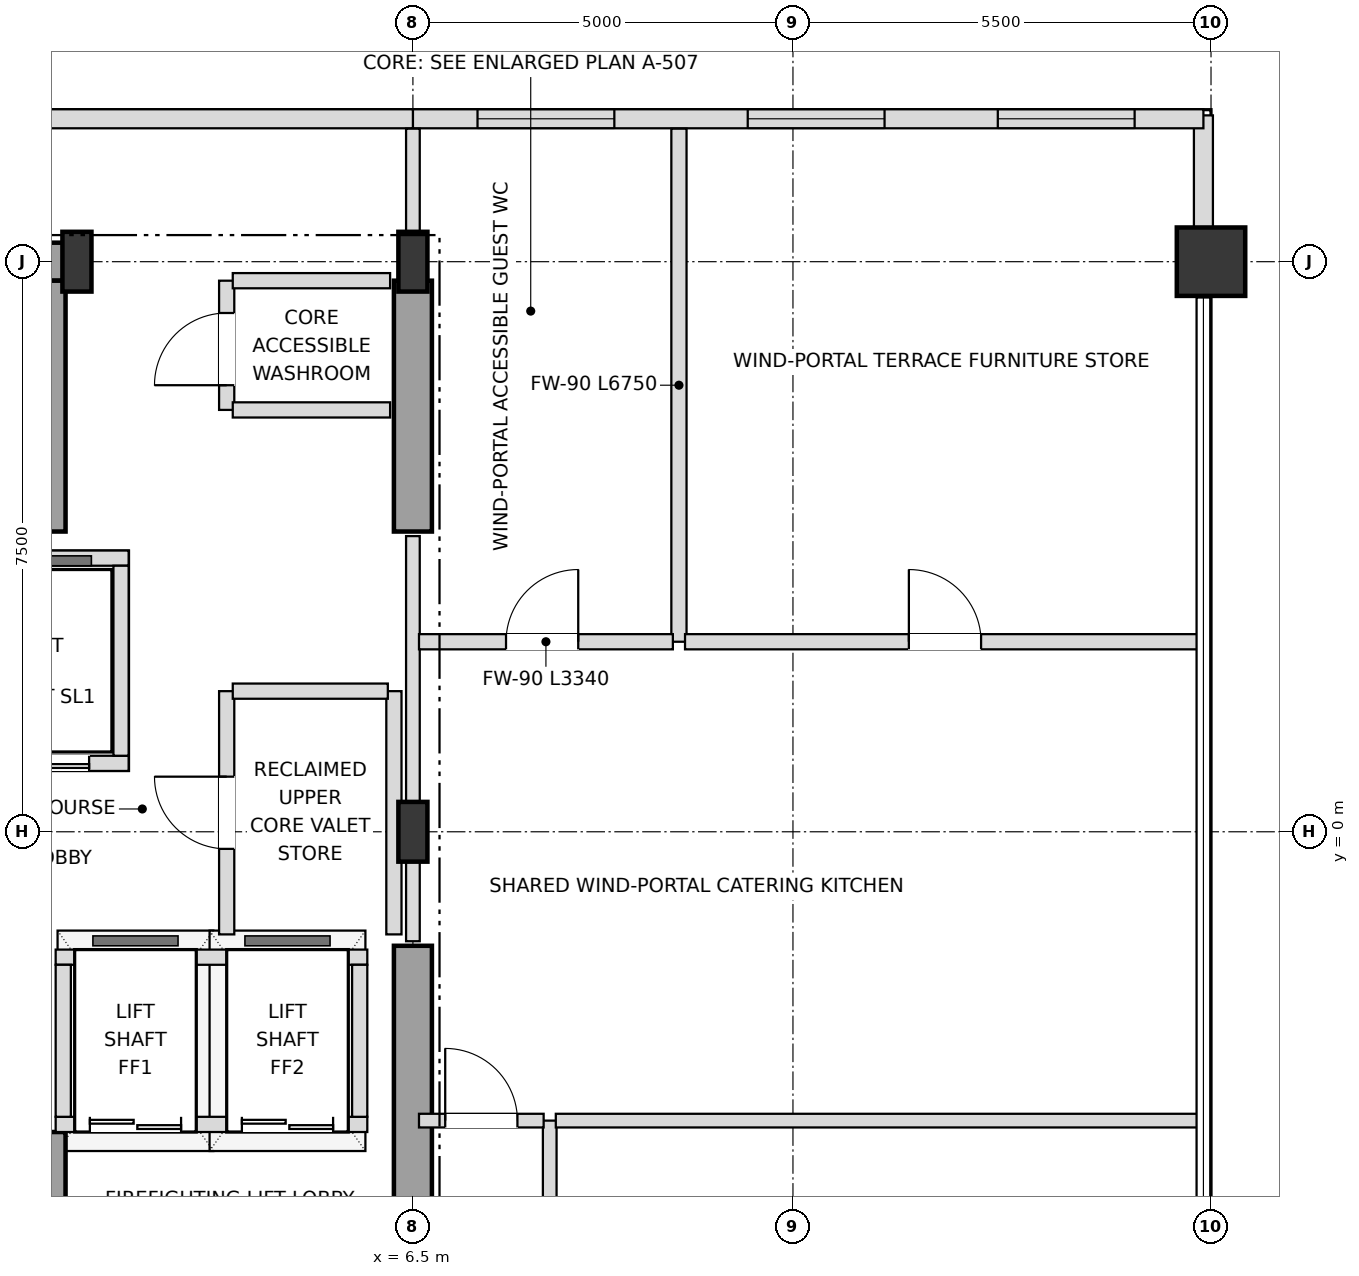
"""IFC4 building model, lengths in metres.
Left out: names, types, materials, properties, quantities, classifications, styles, units other than length and angle.
Written with IfcOpenShell. Run it as: python <this file> out.ifc"""

import sys

from ifc_helpers import new_model, si_unit, direction, frame, frame_2d, origin, origin_2d, place, context, subcontext, project, spatial, rectangle, i_section, extrude, element, fill, save


model = new_model("IFC4")
c1 = context("Model", 3, precision=1e-05, world=origin(), true_north=direction((0.0, 1.0)))
c2 = subcontext(c1, "Body", "Model", "MODEL_VIEW")
j1 = project(units=[si_unit("LENGTHUNIT", "METRE"), si_unit("PLANEANGLEUNIT", "RADIAN")], contexts=[c1])
p1 = place(None, origin())
s1 = spatial("IfcSite", under=j1, at=p1, CompositionType="ELEMENT")
p2 = place(p1, origin())
s2 = spatial("IfcBuilding", under=s1, at=p2, CompositionType="ELEMENT")
p3 = place(p2, frame((0.0, 0.0, 265.5)))
s3 = spatial("IfcBuildingStorey", under=s2, at=p3, CompositionType="ELEMENT", Elevation=265.5)
for number, where, z_axis, x_axis in (
    (1, (6.5, 0.0, 0.0), (0.0, 0.0, 1.0), (1.0, 0.0, 0.0)),
    (2, (2.08, 7.5, 0.0), (0.0, 0.0, 1.0), (1.0, 0.0, 0.0)),
    (3, (6.5, 7.5, 0.0), (0.0, 0.0, 1.0), (1.0, 0.0, 0.0)),
):
    element("IfcColumn", number, at=place(p3, frame(where, z_axis=z_axis, x_axis=x_axis)), inside=s3, PredefinedType="COLUMN", context=c2, shape_type="SweptSolid", body=[
        extrude(i_section(OverallWidth=0.382, OverallDepth=0.786, WebThickness=0.02, FlangeThickness=0.033, at=origin_2d()), origin(), (0.0, 0.0, 1.0), 3.6),
    ])
p4 = place(p3, frame((17.0, 7.5, 0.0), z_axis=(0.0, 0.0, 1.0), x_axis=(1.0, 0.0, 0.0)))
e4 = element("IfcColumn", 4, at=p4, inside=s3, PredefinedType="USERDEFINED", context=c2, shape_type="SweptSolid", body=[
    extrude(rectangle(XDim=0.9, YDim=0.9, at=origin_2d()), origin(), (0.0, 0.0, 1.0), 3.6),
])
p5 = place(p3, frame((16.9, 7.945, 0.0), z_axis=(0.0, 0.0, 1.0), x_axis=(0.0, 1.0, 0.0)))
e5 = element("IfcWall", 5, at=p5, inside=s3, PredefinedType="SOLIDWALL", context=c2, shape_type="SweptSolid", body=[
    extrude(rectangle(XDim=1.48, YDim=0.25, at=frame_2d((0.74, 0.0))), origin(), (0.0, 0.0, 1.0), 2.748),
])
p6 = place(p3, frame((6.5, 9.38, 0.0), z_axis=(0.0, 0.0, 1.0), x_axis=(1.0, 0.0, 0.0)))
e6 = element("IfcWall", 6, at=p6, inside=s3, PredefinedType="SOLIDWALL", context=c2, shape_type="SweptSolid", body=[
    extrude(rectangle(XDim=10.4, YDim=0.25, at=frame_2d((5.2, 0.0))), origin(), (0.0, 0.0, 1.0), 2.826),
])
p7 = place(p6, frame((0.85, 0.0, 0.72)))
e7 = element("IfcOpeningElement", 7, at=p7, cuts=e6, PredefinedType="OPENING", context=c2, shape_type="SweptSolid", body=[
    extrude(rectangle(XDim=1.8, YDim=1.68, at=frame_2d((0.9, 0.84))), frame((0.0, 0.135, 0.0), z_axis=(0.0, -1.0, 0.0), x_axis=(1.0, 0.0, 0.0)), (0.0, 0.0, 1.0), 0.27),
])
p8 = place(p6, frame((4.405, 0.0, 0.72)))
e8 = element("IfcOpeningElement", 8, at=p8, cuts=e6, PredefinedType="OPENING", context=c2, shape_type="SweptSolid", body=[
    extrude(rectangle(XDim=1.8, YDim=1.68, at=frame_2d((0.9, 0.84))), frame((0.0, 0.135, 0.0), z_axis=(0.0, -1.0, 0.0), x_axis=(1.0, 0.0, 0.0)), (0.0, 0.0, 1.0), 0.27),
])
p9 = place(p6, frame((7.695, 0.0, 0.72)))
e9 = element("IfcOpeningElement", 9, at=p9, cuts=e6, PredefinedType="OPENING", context=c2, shape_type="SweptSolid", body=[
    extrude(rectangle(XDim=1.8, YDim=1.68, at=frame_2d((0.9, 0.84))), frame((0.0, 0.135, 0.0), z_axis=(0.0, -1.0, 0.0), x_axis=(1.0, 0.0, 0.0)), (0.0, 0.0, 1.0), 0.27),
])
p10 = place(p3, frame((-6.5, 9.38, 0.0), z_axis=(0.0, 0.0, 1.0), x_axis=(1.0, 0.0, 0.0)))
e10 = element("IfcWall", 10, at=p10, inside=s3, PredefinedType="SOLIDWALL", context=c2, shape_type="SweptSolid", body=[
    extrude(rectangle(XDim=13.0, YDim=0.25, at=frame_2d((6.5, 0.0))), origin(), (0.0, 0.0, 1.0), 2.826),
])
p11 = place(p3, frame((0.0, 7.5, 0.0), z_axis=(0.0, 0.0, 1.0), x_axis=(1.0, 0.0, 0.0)))
e11 = element("IfcWall", 11, at=p11, inside=s3, PredefinedType="SHEAR", context=c2, shape_type="SweptSolid", body=[
    extrude(rectangle(XDim=2.08, YDim=0.5, at=frame_2d((1.04, 0.0))), origin(), (0.0, 0.0, 1.0), 3.38),
])
p12 = place(p3, frame((6.5, -7.25, 0.0), z_axis=(0.0, 0.0, 1.0), x_axis=(0.0, 1.0, 0.0)))
e12 = element("IfcWall", 12, at=p12, inside=s3, PredefinedType="SHEAR", context=c2, shape_type="SweptSolid", body=[
    extrude(rectangle(XDim=5.75, YDim=0.5, at=frame_2d((2.875, 0.0))), origin(), (0.0, 0.0, 1.0), 3.38),
])
p13 = place(p12, frame((0.85, 0.0, 0.0)))
e13 = element("IfcOpeningElement", 13, at=p13, cuts=e12, PredefinedType="OPENING", context=c2, shape_type="SweptSolid", body=[
    extrude(rectangle(XDim=1.05, YDim=2.15, at=frame_2d((0.525, 1.075))), frame((0.0, 0.26, 0.0), z_axis=(0.0, -1.0, 0.0), x_axis=(1.0, 0.0, 0.0)), (0.0, 0.0, 1.0), 0.52),
])
p14 = place(p3, frame((6.5, 3.95, 0.0), z_axis=(0.0, 0.0, 1.0), x_axis=(0.0, 1.0, 0.0)))
e14 = element("IfcWall", 14, at=p14, inside=s3, PredefinedType="SHEAR", context=c2, shape_type="SweptSolid", body=[
    extrude(rectangle(XDim=3.3, YDim=0.5, at=frame_2d((1.65, 0.0))), origin(), (0.0, 0.0, 1.0), 3.38),
])
p15 = place(p3, frame((1.73, -7.25, 0.0), z_axis=(0.0, 0.0, 1.0), x_axis=(0.0, 1.0, 0.0)))
e15 = element("IfcWall", 15, at=p15, inside=s3, PredefinedType="SHEAR", context=c2, shape_type="SweptSolid", body=[
    extrude(rectangle(XDim=3.3, YDim=0.4, at=frame_2d((1.65, 0.0))), origin(), (0.0, 0.0, 1.0), 3.38),
])
p16 = place(p15, frame((0.9, 0.0, 0.0)))
e16 = element("IfcOpeningElement", 16, at=p16, cuts=e15, PredefinedType="OPENING", context=c2, shape_type="SweptSolid", body=[
    extrude(rectangle(XDim=1.05, YDim=2.15, at=frame_2d((0.525, 1.075))), frame((0.0, 0.21, 0.0), z_axis=(0.0, -1.0, 0.0), x_axis=(1.0, 0.0, 0.0)), (0.0, 0.0, 1.0), 0.42),
])
p17 = place(p3, frame((1.73, 3.95, 0.0), z_axis=(0.0, 0.0, 1.0), x_axis=(0.0, 1.0, 0.0)))
e17 = element("IfcWall", 17, at=p17, inside=s3, PredefinedType="SHEAR", context=c2, shape_type="SweptSolid", body=[
    extrude(rectangle(XDim=3.3, YDim=0.4, at=frame_2d((1.65, 0.0))), origin(), (0.0, 0.0, 1.0), 3.38),
])
p18 = place(p3, frame((-2.82, 0.9, 0.0), z_axis=(0.0, 0.0, 1.0), x_axis=(1.0, 0.0, 0.0)))
e18 = element("IfcWall", 18, at=p18, inside=s3, PredefinedType="SOLIDWALL", context=c2, shape_type="SweptSolid", body=[
    extrude(rectangle(XDim=5.58, YDim=0.2, at=frame_2d((2.79, 0.0))), origin(), (0.0, 0.0, 1.0), 3.38),
])
p19 = place(p18, frame((0.49, 0.0, 0.0)))
e19 = element("IfcOpeningElement", 19, at=p19, cuts=e18, PredefinedType="OPENING", context=c2, shape_type="SweptSolid", body=[
    extrude(rectangle(XDim=1.1, YDim=2.15, at=frame_2d((0.55, 1.075))), frame((0.0, 0.11, 0.0), z_axis=(0.0, -1.0, 0.0), x_axis=(1.0, 0.0, 0.0)), (0.0, 0.0, 1.0), 0.22),
])
p20 = place(p18, frame((2.17, 0.0, 0.0)))
e20 = element("IfcOpeningElement", 20, at=p20, cuts=e18, PredefinedType="OPENING", context=c2, shape_type="SweptSolid", body=[
    extrude(rectangle(XDim=1.1, YDim=2.15, at=frame_2d((0.55, 1.075))), frame((0.0, 0.11, 0.0), z_axis=(0.0, -1.0, 0.0), x_axis=(1.0, 0.0, 0.0)), (0.0, 0.0, 1.0), 0.22),
])
p21 = place(p18, frame((3.86, 0.0, 0.0)))
e21 = element("IfcOpeningElement", 21, at=p21, cuts=e18, PredefinedType="OPENING", context=c2, shape_type="SweptSolid", body=[
    extrude(rectangle(XDim=1.2, YDim=2.2, at=frame_2d((0.6, 1.1))), frame((0.0, 0.11, 0.0), z_axis=(0.0, -1.0, 0.0), x_axis=(1.0, 0.0, 0.0)), (0.0, 0.0, 1.0), 0.22),
])
p22 = place(p3, frame((-2.82, 3.6, 0.0), z_axis=(0.0, 0.0, 1.0), x_axis=(1.0, 0.0, 0.0)))
e22 = element("IfcWall", 22, at=p22, inside=s3, PredefinedType="SOLIDWALL", context=c2, shape_type="SweptSolid", body=[
    extrude(rectangle(XDim=5.58, YDim=0.2, at=frame_2d((2.79, 0.0))), origin(), (0.0, 0.0, 1.0), 3.38),
])
p23 = place(p3, frame((2.66, 1.0, 0.0), z_axis=(0.0, 0.0, 1.0), x_axis=(0.0, 1.0, 0.0)))
e23 = element("IfcWall", 23, at=p23, inside=s3, PredefinedType="SOLIDWALL", context=c2, shape_type="SweptSolid", body=[
    extrude(rectangle(XDim=2.5, YDim=0.2, at=frame_2d((1.25, 0.0))), origin(), (0.0, 0.0, 1.0), 3.38),
])
p24 = place(p3, frame((1.8, -3.85, 0.0), z_axis=(0.0, 0.0, 1.0), x_axis=(1.0, 0.0, 0.0)))
e24 = element("IfcWall", 24, at=p24, inside=s3, PredefinedType="SOLIDWALL", context=c2, shape_type="SweptSolid", body=[
    extrude(rectangle(XDim=4.1, YDim=0.2, at=frame_2d((2.05, 0.0))), origin(), (0.0, 0.0, 1.0), 3.38),
])
p25 = place(p24, frame((0.45, 0.0, 0.0)))
e25 = element("IfcOpeningElement", 25, at=p25, cuts=e24, PredefinedType="OPENING", context=c2, shape_type="SweptSolid", body=[
    extrude(rectangle(XDim=1.2, YDim=2.2, at=frame_2d((0.6, 1.1))), frame((0.0, 0.11, 0.0), z_axis=(0.0, -1.0, 0.0), x_axis=(1.0, 0.0, 0.0)), (0.0, 0.0, 1.0), 0.22),
])
p26 = place(p24, frame((2.45, 0.0, 0.0)))
e26 = element("IfcOpeningElement", 26, at=p26, cuts=e24, PredefinedType="OPENING", context=c2, shape_type="SweptSolid", body=[
    extrude(rectangle(XDim=1.2, YDim=2.2, at=frame_2d((0.6, 1.1))), frame((0.0, 0.11, 0.0), z_axis=(0.0, -1.0, 0.0), x_axis=(1.0, 0.0, 0.0)), (0.0, 0.0, 1.0), 0.22),
])
p27 = place(p3, frame((1.8, -1.65, 0.0), z_axis=(0.0, 0.0, 1.0), x_axis=(1.0, 0.0, 0.0)))
e27 = element("IfcWall", 27, at=p27, inside=s3, PredefinedType="SOLIDWALL", context=c2, shape_type="SweptSolid", body=[
    extrude(rectangle(XDim=4.1, YDim=0.2, at=frame_2d((2.05, 0.0))), origin(), (0.0, 0.0, 1.0), 3.38),
])
for number, where, z_axis, x_axis in (
    (28, (1.9, -3.75, 0.0), (0.0, 0.0, 1.0), (0.0, 1.0, 0.0)),
    (29, (5.8, -3.75, 0.0), (0.0, 0.0, 1.0), (0.0, 1.0, 0.0)),
):
    element("IfcWall", number, at=place(p3, frame(where, z_axis=z_axis, x_axis=x_axis)), inside=s3, PredefinedType="SOLIDWALL", context=c2, shape_type="SweptSolid", body=[
        extrude(rectangle(XDim=2.0, YDim=0.2, at=frame_2d((1.0, 0.0))), origin(), (0.0, 0.0, 1.0), 3.38),
    ])
p28 = place(p3, frame((4.05, -1.35, 0.0), z_axis=(0.0, 0.0, 1.0), x_axis=(0.0, 1.0, 0.0)))
e30 = element("IfcWall", 30, at=p28, inside=s3, PredefinedType="SOLIDWALL", context=c2, shape_type="SweptSolid", body=[
    extrude(rectangle(XDim=3.2, YDim=0.2, at=frame_2d((1.6, 0.0))), origin(), (0.0, 0.0, 1.0), 3.38),
])
p29 = place(p28, frame((1.125, 0.0, 0.0)))
e31 = element("IfcOpeningElement", 31, at=p29, cuts=e30, PredefinedType="OPENING", context=c2, shape_type="SweptSolid", body=[
    extrude(rectangle(XDim=0.95, YDim=2.15, at=frame_2d((0.475, 1.075))), frame((0.0, 0.11, 0.0), z_axis=(0.0, -1.0, 0.0), x_axis=(1.0, 0.0, 0.0)), (0.0, 0.0, 1.0), 0.22),
])
p30 = place(p3, frame((4.05, 5.55, 0.0), z_axis=(0.0, 0.0, 1.0), x_axis=(0.0, 1.0, 0.0)))
e32 = element("IfcWall", 32, at=p30, inside=s3, PredefinedType="SOLIDWALL", context=c2, shape_type="SweptSolid", body=[
    extrude(rectangle(XDim=1.7, YDim=0.2, at=frame_2d((0.85, 0.0))), origin(), (0.0, 0.0, 1.0), 3.38),
])
p31 = place(p30, frame((0.325, 0.0, 0.0)))
e33 = element("IfcOpeningElement", 33, at=p31, cuts=e32, PredefinedType="OPENING", context=c2, shape_type="SweptSolid", body=[
    extrude(rectangle(XDim=0.95, YDim=2.15, at=frame_2d((0.475, 1.075))), frame((0.0, 0.11, 0.0), z_axis=(0.0, -1.0, 0.0), x_axis=(1.0, 0.0, 0.0)), (0.0, 0.0, 1.0), 0.22),
])
p32 = place(p3, frame((6.25, -1.35, 0.0), z_axis=(0.0, 0.0, 1.0), x_axis=(0.0, 1.0, 0.0)))
e34 = element("IfcWall", 34, at=p32, inside=s3, PredefinedType="SOLIDWALL", context=c2, shape_type="SweptSolid", body=[
    extrude(rectangle(XDim=3.2, YDim=0.2, at=frame_2d((1.6, 0.0))), origin(), (0.0, 0.0, 1.0), 3.38),
])
p33 = place(p3, frame((6.5, -1.44, 0.0), z_axis=(0.0, 0.0, 1.0), x_axis=(0.0, 1.0, 0.0)))
e35 = element("IfcWall", 35, at=p33, inside=s3, PredefinedType="PARTITIONING", context=c2, shape_type="SweptSolid", body=[
    extrude(rectangle(XDim=5.33, YDim=0.18, at=frame_2d((2.665, 0.0))), origin(), (0.0, 0.0, 1.0), 2.826),
])
p34 = place(p3, frame((6.5, 7.31, 0.0), z_axis=(0.0, 0.0, 1.0), x_axis=(0.0, 1.0, 0.0)))
e36 = element("IfcWall", 36, at=p34, inside=s3, PredefinedType="PARTITIONING", context=c2, shape_type="SweptSolid", body=[
    extrude(rectangle(XDim=1.94, YDim=0.18, at=frame_2d((0.97, 0.0))), origin(), (0.0, 0.0, 1.0), 2.826),
])
p35 = place(p3, frame((8.3, -9.2, 0.0), z_axis=(0.0, 0.0, 1.0), x_axis=(0.0, 1.0, 0.0)))
e37 = element("IfcWall", 37, at=p35, inside=s3, PredefinedType="PARTITIONING", context=c2, shape_type="SweptSolid", body=[
    extrude(rectangle(XDim=5.4, YDim=0.18, at=frame_2d((2.7, 0.0))), origin(), (0.0, 0.0, 1.0), 2.826),
])
p36 = place(p35, frame((3.125, 0.0, 0.0)))
e38 = element("IfcOpeningElement", 38, at=p36, cuts=e37, PredefinedType="OPENING", context=c2, shape_type="SweptSolid", body=[
    extrude(rectangle(XDim=0.95, YDim=2.15, at=frame_2d((0.475, 1.075))), frame((0.0, 0.1, 0.0), z_axis=(0.0, -1.0, 0.0), x_axis=(1.0, 0.0, 0.0)), (0.0, 0.0, 1.0), 0.2),
])
p37 = place(p3, frame((10.0, 2.5, 0.0), z_axis=(0.0, 0.0, 1.0), x_axis=(0.0, 1.0, 0.0)))
e39 = element("IfcWall", 39, at=p37, inside=s3, PredefinedType="SOLIDWALL", context=c2, shape_type="SweptSolid", body=[
    extrude(rectangle(XDim=6.75, YDim=0.2, at=frame_2d((3.375, 0.0))), origin(), (0.0, 0.0, 1.0), 2.826),
])
p38 = place(p3, frame((6.58, -3.8, 0.0), z_axis=(0.0, 0.0, 1.0), x_axis=(1.0, 0.0, 0.0)))
e40 = element("IfcWall", 40, at=p38, inside=s3, PredefinedType="PARTITIONING", context=c2, shape_type="SweptSolid", body=[
    extrude(rectangle(XDim=1.64, YDim=0.18, at=frame_2d((0.82, 0.0))), origin(), (0.0, 0.0, 1.0), 3.38),
])
p39 = place(p38, frame((0.345, 0.0, 0.0)))
e41 = element("IfcOpeningElement", 41, at=p39, cuts=e40, PredefinedType="OPENING", context=c2, shape_type="SweptSolid", body=[
    extrude(rectangle(XDim=0.95, YDim=2.15, at=frame_2d((0.475, 1.075))), frame((0.0, 0.1, 0.0), z_axis=(0.0, -1.0, 0.0), x_axis=(1.0, 0.0, 0.0)), (0.0, 0.0, 1.0), 0.2),
])
p40 = place(p3, frame((8.38, -3.8, 0.0), z_axis=(0.0, 0.0, 1.0), x_axis=(1.0, 0.0, 0.0)))
e42 = element("IfcWall", 42, at=p40, inside=s3, PredefinedType="PARTITIONING", context=c2, shape_type="SweptSolid", body=[
    extrude(rectangle(XDim=8.44, YDim=0.18, at=frame_2d((4.22, 0.0))), origin(), (0.0, 0.0, 1.0), 3.018),
])
p41 = place(p3, frame((4.13, 1.85, 0.0), z_axis=(0.0, 0.0, 1.0), x_axis=(1.0, 0.0, 0.0)))
e43 = element("IfcWall", 43, at=p41, inside=s3, PredefinedType="SOLIDWALL", context=c2, shape_type="SweptSolid", body=[
    extrude(rectangle(XDim=2.04, YDim=0.2, at=frame_2d((1.02, 0.0))), origin(), (0.0, 0.0, 1.0), 3.38),
])
p42 = place(p3, frame((6.58, 2.5, 0.0), z_axis=(0.0, 0.0, 1.0), x_axis=(1.0, 0.0, 0.0)))
e44 = element("IfcWall", 44, at=p42, inside=s3, PredefinedType="SOLIDWALL", context=c2, shape_type="SweptSolid", body=[
    extrude(rectangle(XDim=3.34, YDim=0.2, at=frame_2d((1.67, 0.0))), origin(), (0.0, 0.0, 1.0), 3.38),
])
p43 = place(p42, frame((1.145, 0.0, 0.0)))
e45 = element("IfcOpeningElement", 45, at=p43, cuts=e44, PredefinedType="OPENING", context=c2, shape_type="SweptSolid", body=[
    extrude(rectangle(XDim=0.95, YDim=2.15, at=frame_2d((0.475, 1.075))), frame((0.0, 0.11, 0.0), z_axis=(0.0, -1.0, 0.0), x_axis=(1.0, 0.0, 0.0)), (0.0, 0.0, 1.0), 0.22),
])
p44 = place(p3, frame((10.08, 2.5, 0.0), z_axis=(0.0, 0.0, 1.0), x_axis=(1.0, 0.0, 0.0)))
e46 = element("IfcWall", 46, at=p44, inside=s3, PredefinedType="SOLIDWALL", context=c2, shape_type="SweptSolid", body=[
    extrude(rectangle(XDim=6.74, YDim=0.2, at=frame_2d((3.37, 0.0))), origin(), (0.0, 0.0, 1.0), 3.018),
])
p45 = place(p44, frame((2.945, 0.0, 0.0)))
e47 = element("IfcOpeningElement", 47, at=p45, cuts=e46, PredefinedType="OPENING", context=c2, shape_type="SweptSolid", body=[
    extrude(rectangle(XDim=0.95, YDim=2.15, at=frame_2d((0.475, 1.075))), frame((0.0, 0.11, 0.0), z_axis=(0.0, -1.0, 0.0), x_axis=(1.0, 0.0, 0.0)), (0.0, 0.0, 1.0), 0.22),
])
for number, where, z_axis, x_axis in (
    (48, (4.13, 5.55, 0.0), (0.0, 0.0, 1.0), (1.0, 0.0, 0.0)),
    (49, (4.13, 7.25, 0.0), (0.0, 0.0, 1.0), (1.0, 0.0, 0.0)),
):
    element("IfcWall", number, at=place(p3, frame(where, z_axis=z_axis, x_axis=x_axis)), inside=s3, PredefinedType="SOLIDWALL", context=c2, shape_type="SweptSolid", body=[
        extrude(rectangle(XDim=2.07, YDim=0.2, at=frame_2d((1.035, 0.0))), origin(), (0.0, 0.0, 1.0), 3.38),
    ])
p46 = place(p7, origin())
e50 = element("IfcWindow", 50, at=p46, inside=s3, PartitioningType="SINGLE_PANEL", PredefinedType="WINDOW", context=c2, shape_type="SweptSolid", body=[
    extrude(rectangle(XDim=1.8, YDim=1.68, at=frame_2d((0.9, 0.84))), frame((0.0, 0.03, 0.0), z_axis=(0.0, -1.0, 0.0), x_axis=(1.0, 0.0, 0.0)), (0.0, 0.0, 1.0), 0.06),
])
fill(e7, e50)
p47 = place(p8, origin())
e51 = element("IfcWindow", 51, at=p47, inside=s3, PartitioningType="SINGLE_PANEL", PredefinedType="WINDOW", context=c2, shape_type="SweptSolid", body=[
    extrude(rectangle(XDim=1.8, YDim=1.68, at=frame_2d((0.9, 0.84))), frame((0.0, 0.03, 0.0), z_axis=(0.0, -1.0, 0.0), x_axis=(1.0, 0.0, 0.0)), (0.0, 0.0, 1.0), 0.06),
])
fill(e8, e51)
p48 = place(p9, origin())
e52 = element("IfcWindow", 52, at=p48, inside=s3, PartitioningType="SINGLE_PANEL", PredefinedType="WINDOW", context=c2, shape_type="SweptSolid", body=[
    extrude(rectangle(XDim=1.8, YDim=1.68, at=frame_2d((0.9, 0.84))), frame((0.0, 0.03, 0.0), z_axis=(0.0, -1.0, 0.0), x_axis=(1.0, 0.0, 0.0)), (0.0, 0.0, 1.0), 0.06),
])
fill(e9, e52)
p49 = place(p21, origin())
e53 = element("IfcDoor", 53, at=p49, inside=s3, OperationType="DOUBLE_DOOR_SLIDING", PredefinedType="DOOR", context=c2, shape_type="SweptSolid", body=[
    extrude(rectangle(XDim=1.2, YDim=2.2, at=frame_2d((0.6, 1.1))), frame((0.0, 0.025, 0.0), z_axis=(0.0, -1.0, 0.0), x_axis=(1.0, 0.0, 0.0)), (0.0, 0.0, 1.0), 0.05),
])
fill(e21, e53)
p50 = place(p25, origin())
e54 = element("IfcDoor", 54, at=p50, inside=s3, OperationType="DOUBLE_DOOR_SLIDING", PredefinedType="DOOR", context=c2, shape_type="SweptSolid", body=[
    extrude(rectangle(XDim=1.2, YDim=2.2, at=frame_2d((0.6, 1.1))), frame((0.0, 0.025, 0.0), z_axis=(0.0, -1.0, 0.0), x_axis=(1.0, 0.0, 0.0)), (0.0, 0.0, 1.0), 0.05),
])
fill(e25, e54)
p51 = place(p26, origin())
e55 = element("IfcDoor", 55, at=p51, inside=s3, OperationType="DOUBLE_DOOR_SLIDING", PredefinedType="DOOR", context=c2, shape_type="SweptSolid", body=[
    extrude(rectangle(XDim=1.2, YDim=2.2, at=frame_2d((0.6, 1.1))), frame((0.0, 0.025, 0.0), z_axis=(0.0, -1.0, 0.0), x_axis=(1.0, 0.0, 0.0)), (0.0, 0.0, 1.0), 0.05),
])
fill(e26, e55)
p52 = place(p29, origin())
e56 = element("IfcDoor", 56, at=p52, inside=s3, OperationType="SINGLE_SWING_RIGHT", PredefinedType="DOOR", context=c2, shape_type="SweptSolid", body=[
    extrude(rectangle(XDim=0.95, YDim=2.15, at=frame_2d((0.475, 1.075))), frame((0.0, 0.025, 0.0), z_axis=(0.0, -1.0, 0.0), x_axis=(1.0, 0.0, 0.0)), (0.0, 0.0, 1.0), 0.05),
])
fill(e31, e56)
p53 = place(p31, origin())
e57 = element("IfcDoor", 57, at=p53, inside=s3, OperationType="SINGLE_SWING_LEFT", PredefinedType="DOOR", context=c2, shape_type="SweptSolid", body=[
    extrude(rectangle(XDim=0.95, YDim=2.15, at=frame_2d((0.475, 1.075))), frame((0.0, 0.025, 0.0), z_axis=(0.0, -1.0, 0.0), x_axis=(1.0, 0.0, 0.0)), (0.0, 0.0, 1.0), 0.05),
])
fill(e33, e57)
p54 = place(p39, origin())
e58 = element("IfcDoor", 58, at=p54, inside=s3, OperationType="SINGLE_SWING_LEFT", PredefinedType="DOOR", context=c2, shape_type="SweptSolid", body=[
    extrude(rectangle(XDim=0.95, YDim=2.15, at=frame_2d((0.475, 1.075))), frame((0.0, 0.025, 0.0), z_axis=(0.0, -1.0, 0.0), x_axis=(1.0, 0.0, 0.0)), (0.0, 0.0, 1.0), 0.05),
])
fill(e41, e58)
p55 = place(p43, origin())
e59 = element("IfcDoor", 59, at=p55, inside=s3, OperationType="SINGLE_SWING_RIGHT", PredefinedType="DOOR", context=c2, shape_type="SweptSolid", body=[
    extrude(rectangle(XDim=0.95, YDim=2.15, at=frame_2d((0.475, 1.075))), frame((0.0, 0.025, 0.0), z_axis=(0.0, -1.0, 0.0), x_axis=(1.0, 0.0, 0.0)), (0.0, 0.0, 1.0), 0.05),
])
fill(e45, e59)
p56 = place(p45, origin())
e60 = element("IfcDoor", 60, at=p56, inside=s3, OperationType="SINGLE_SWING_LEFT", PredefinedType="DOOR", context=c2, shape_type="SweptSolid", body=[
    extrude(rectangle(XDim=0.95, YDim=2.15, at=frame_2d((0.475, 1.075))), frame((0.0, 0.025, 0.0), z_axis=(0.0, -1.0, 0.0), x_axis=(1.0, 0.0, 0.0)), (0.0, 0.0, 1.0), 0.05),
])
fill(e47, e60)
save(model, sys.argv[1])
